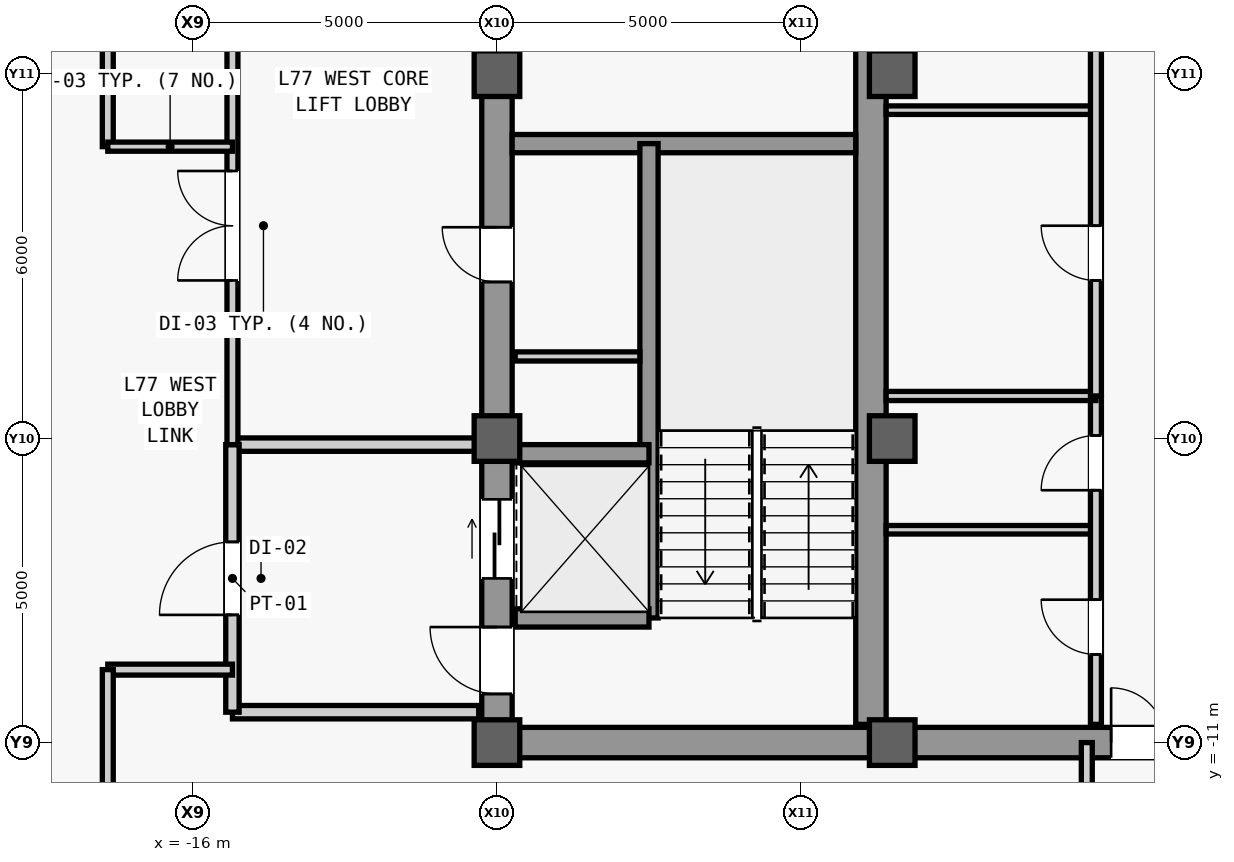
"""IFC4 building model, lengths in metres.
Left out: names, types, materials, properties, quantities, classifications, styles, units other than length and angle.
Written with IfcOpenShell. Run it as: python <this file> out.ifc"""

import sys

from ifc_helpers import new_model, si_unit, direction, frame, frame_2d, origin, origin_2d, place, context, subcontext, project, spatial, rectangle, extrude, source, transform, mapped, element, fill, save


model = new_model("IFC4")
c1 = context("Model", 3, precision=1e-05, world=origin(), true_north=direction((0.0, 1.0)))
c2 = subcontext(c1, "Body", "Model", "MODEL_VIEW")
j1 = project(units=[si_unit("LENGTHUNIT", "METRE"), si_unit("PLANEANGLEUNIT", "RADIAN")], contexts=[c1])
p1 = place(None, origin())
s1 = spatial("IfcSite", under=j1, at=p1, CompositionType="ELEMENT")
p2 = place(p1, origin())
s2 = spatial("IfcBuilding", under=s1, at=p2, CompositionType="ELEMENT")
p3 = place(p2, frame((0.0, 0.0, 326.3)))
s3 = spatial("IfcBuildingStorey", under=s2, at=p3, CompositionType="ELEMENT", Elevation=326.3)
m1 = source(origin(), c2, "Body", "SweptSolid", [
    extrude(rectangle(XDim=22.0, YDim=0.5, at=frame_2d((11.0, 0.0))), origin(), (0.0, 0.0, 1.0), 3.74),
])
p4 = place(p3, frame((-11.0, -11.0, 0.0), z_axis=(0.0, 0.0, 1.0), x_axis=(0.0, 1.0, 0.0)))
e1 = element("IfcWall", 1, at=p4, inside=s3, PredefinedType="SHEAR", context=c2, shape_type="MappedRepresentation", body=[
    mapped(m1, transform((0.0, 0.0, 0.0), scale=1.0)),
])
m2 = source(origin(), c2, "Body", "SweptSolid", [
    extrude(rectangle(XDim=1.1, YDim=2.2, at=frame_2d((0.55, 1.1))), frame((0.0, 0.26, 0.0), z_axis=(0.0, -1.0, 0.0), x_axis=(1.0, 0.0, 0.0)), (0.0, 0.0, 1.0), 0.52),
])
p5 = place(p4, frame((0.8, 0.0, 0.0)))
e2 = element("IfcOpeningElement", 2, at=p5, cuts=e1, PredefinedType="OPENING", context=c2, shape_type="MappedRepresentation", body=[
    mapped(m2, transform((0.0, 0.0, 0.0), scale=1.0)),
])
p6 = place(p4, frame((12.5, 0.0, 0.0)))
e3 = element("IfcOpeningElement", 3, at=p6, cuts=e1, PredefinedType="OPENING", context=c2, shape_type="MappedRepresentation", body=[
    mapped(m2, transform((0.0, 0.0, 0.0), scale=1.0)),
])
m3 = source(origin(), c2, "Body", "SweptSolid", [
    extrude(rectangle(XDim=0.9, YDim=2.15, at=frame_2d((0.45, 1.075))), frame((0.0, 0.26, 0.0), z_axis=(0.0, -1.0, 0.0), x_axis=(1.0, 0.0, 0.0)), (0.0, 0.0, 1.0), 0.52),
])
p7 = place(p4, frame((7.575, 0.0, 0.0)))
e4 = element("IfcOpeningElement", 4, at=p7, cuts=e1, PredefinedType="OPENING", context=c2, shape_type="MappedRepresentation", body=[
    mapped(m3, transform((0.0, 0.0, 0.0), scale=1.0)),
])
m4 = source(origin(), c2, "Body", "SweptSolid", [
    extrude(rectangle(XDim=1.2, YDim=2.3, at=frame_2d((0.6, 1.15))), frame((0.0, 0.26, 0.0), z_axis=(0.0, -1.0, 0.0), x_axis=(1.0, 0.0, 0.0)), (0.0, 0.0, 1.0), 0.52),
])
p8 = place(p4, frame((14.6, 0.0, 0.0)))
e5 = element("IfcOpeningElement", 5, at=p8, cuts=e1, PredefinedType="OPENING", context=c2, shape_type="MappedRepresentation", body=[
    mapped(m4, transform((0.0, 0.0, 0.0), scale=1.0)),
])
p9 = place(p4, frame((18.2, 0.0, 0.0)))
e6 = element("IfcOpeningElement", 6, at=p9, cuts=e1, PredefinedType="OPENING", context=c2, shape_type="MappedRepresentation", body=[
    mapped(m4, transform((0.0, 0.0, 0.0), scale=1.0)),
])
m5 = source(origin(), c2, "Body", "SweptSolid", [
    extrude(rectangle(XDim=1.3, YDim=2.3, at=frame_2d((0.65, 1.15))), frame((0.0, 0.26, 0.0), z_axis=(0.0, -1.0, 0.0), x_axis=(1.0, 0.0, 0.0)), (0.0, 0.0, 1.0), 0.52),
])
p10 = place(p4, frame((2.7, 0.0, 0.0)))
e7 = element("IfcOpeningElement", 7, at=p10, cuts=e1, PredefinedType="OPENING", context=c2, shape_type="MappedRepresentation", body=[
    mapped(m5, transform((0.0, 0.0, 0.0), scale=1.0)),
])
m6 = source(origin(), c2, "Body", "SweptSolid", [
    extrude(rectangle(XDim=21.4, YDim=0.5, at=frame_2d((10.7, 0.0))), origin(), (0.0, 0.0, 1.0), 3.74),
])
p11 = place(p3, frame((-4.85, -10.7, 0.0), z_axis=(0.0, 0.0, 1.0), x_axis=(0.0, 1.0, 0.0)))
e8 = element("IfcWall", 8, at=p11, inside=s3, PredefinedType="SHEAR", context=c2, shape_type="MappedRepresentation", body=[
    mapped(m6, transform((0.0, 0.0, 0.0), scale=1.0)),
])
m7 = source(origin(), c2, "Body", "SweptSolid", [
    extrude(rectangle(XDim=5.9, YDim=0.5, at=frame_2d((2.95, 0.0))), origin(), (0.0, 0.0, 1.0), 3.74),
])
p12 = place(p3, frame((-10.75, -11.0, 0.0), z_axis=(0.0, 0.0, 1.0), x_axis=(1.0, 0.0, 0.0)))
e9 = element("IfcWall", 9, at=p12, inside=s3, PredefinedType="SHEAR", context=c2, shape_type="MappedRepresentation", body=[
    mapped(m7, transform((0.0, 0.0, 0.0), scale=1.0)),
])
m8 = source(origin(), c2, "Body", "SweptSolid", [
    extrude(rectangle(XDim=5.65, YDim=0.3, at=frame_2d((2.825, 0.0))), origin(), (0.0, 0.0, 1.0), 3.74),
])
p13 = place(p3, frame((-10.75, -1.15, 0.0), z_axis=(0.0, 0.0, 1.0), x_axis=(1.0, 0.0, 0.0)))
e10 = element("IfcWall", 10, at=p13, inside=s3, PredefinedType="SHEAR", context=c2, shape_type="MappedRepresentation", body=[
    mapped(m8, transform((0.0, 0.0, 0.0), scale=1.0)),
])
m9 = source(origin(), c2, "Body", "SweptSolid", [
    extrude(rectangle(XDim=9.2, YDim=0.5, at=frame_2d((4.6, 0.0))), origin(), (0.0, 0.0, 1.0), 3.74),
])
p14 = place(p3, frame((-4.6, -11.0, 0.0), z_axis=(0.0, 0.0, 1.0), x_axis=(1.0, 0.0, 0.0)))
e11 = element("IfcWall", 11, at=p14, inside=s3, PredefinedType="SHEAR", context=c2, shape_type="MappedRepresentation", body=[
    mapped(m9, transform((0.0, 0.0, 0.0), scale=1.0)),
])
m10 = source(origin(), c2, "Body", "SweptSolid", [
    extrude(rectangle(XDim=1.8, YDim=2.25, at=frame_2d((0.9, 1.125))), frame((0.0, 0.26, 0.0), z_axis=(0.0, -1.0, 0.0), x_axis=(1.0, 0.0, 0.0)), (0.0, 0.0, 1.0), 0.52),
])
p15 = place(p14, frame((3.7, 0.0, 0.0)))
e12 = element("IfcOpeningElement", 12, at=p15, cuts=e11, PredefinedType="OPENING", context=c2, shape_type="MappedRepresentation", body=[
    mapped(m10, transform((0.0, 0.0, 0.0), scale=1.0)),
])
m11 = source(origin(), c2, "Body", "SweptSolid", [
    extrude(rectangle(XDim=0.75, YDim=0.75, at=origin_2d()), origin(), (0.0, 0.0, 1.0), 4.0),
])
for number, where, z_axis, x_axis in (
    (13, (-11.0, -11.0, 0.0), (0.0, 0.0, 1.0), (1.0, 0.0, 0.0)),
    (14, (-11.0, -6.0, 0.0), (0.0, 0.0, 1.0), (1.0, 0.0, 0.0)),
    (15, (-11.0, 0.0, 0.0), (0.0, 0.0, 1.0), (1.0, 0.0, 0.0)),
    (16, (-4.5, -11.0, 0.0), (0.0, 0.0, 1.0), (1.0, 0.0, 0.0)),
    (17, (-4.5, -6.0, 0.0), (0.0, 0.0, 1.0), (1.0, 0.0, 0.0)),
    (18, (-4.5, 0.0, 0.0), (0.0, 0.0, 1.0), (1.0, 0.0, 0.0)),
):
    element("IfcColumn", number, at=place(p3, frame(where, z_axis=z_axis, x_axis=x_axis)), inside=s3, PredefinedType="COLUMN", context=c2, shape_type="MappedRepresentation", body=[
        mapped(m11, transform((0.0, 0.0, 0.0), scale=1.0)),
    ])
m12 = source(origin(), c2, "Body", "SweptSolid", [
    extrude(rectangle(XDim=7.8, YDim=0.3, at=frame_2d((3.9, 0.0))), origin(), (0.0, 0.0, 1.0), 3.74),
])
p16 = place(p3, frame((-8.5, -8.95, 0.0), z_axis=(0.0, 0.0, 1.0), x_axis=(0.0, 1.0, 0.0)))
e19 = element("IfcWall", 19, at=p16, inside=s3, PredefinedType="SHEAR", context=c2, shape_type="MappedRepresentation", body=[
    mapped(m12, transform((0.0, 0.0, 0.0), scale=1.0)),
])
m13 = source(origin(), c2, "Body", "SweptSolid", [
    extrude(rectangle(XDim=2.2, YDim=0.3, at=frame_2d((1.1, 0.0))), origin(), (0.0, 0.0, 1.0), 3.74),
])
for number, where, z_axis, x_axis in (
    (20, (-10.7, -8.95, 0.0), (0.0, 0.0, 1.0), (1.0, 0.0, 0.0)),
    (21, (-10.7, -6.25, 0.0), (0.0, 0.0, 1.0), (1.0, 0.0, 0.0)),
):
    element("IfcWall", number, at=place(p3, frame(where, z_axis=z_axis, x_axis=x_axis)), inside=s3, PredefinedType="SHEAR", context=c2, shape_type="MappedRepresentation", body=[
        mapped(m13, transform((0.0, 0.0, 0.0), scale=1.0)),
    ])
m14 = source(origin(), c2, "Body", "SweptSolid", [
    extrude(rectangle(XDim=2.05, YDim=0.15, at=frame_2d((1.025, 0.0))), origin(), (0.0, 0.0, 1.0), 3.74),
])
p17 = place(p3, frame((-10.7, -4.65, 0.0), z_axis=(0.0, 0.0, 1.0), x_axis=(1.0, 0.0, 0.0)))
e22 = element("IfcWall", 22, at=p17, inside=s3, PredefinedType="PARTITIONING", context=c2, shape_type="MappedRepresentation", body=[
    mapped(m14, transform((0.0, 0.0, 0.0), scale=1.0)),
])
m15 = source(origin(), c2, "Body", "SweptSolid", [
    extrude(rectangle(XDim=4.05, YDim=0.22, at=frame_2d((2.025, 0.0))), origin(), (0.0, 0.0, 1.0), 3.74),
])
p18 = place(p3, frame((-15.35, -10.5, 0.0), z_axis=(0.0, 0.0, 1.0), x_axis=(1.0, 0.0, 0.0)))
e23 = element("IfcWall", 23, at=p18, inside=s3, PredefinedType="PARTITIONING", context=c2, shape_type="MappedRepresentation", body=[
    mapped(m15, transform((0.0, 0.0, 0.0), scale=1.0)),
])
m16 = source(origin(), c2, "Body", "SweptSolid", [
    extrude(rectangle(XDim=4.05, YDim=0.22, at=frame_2d((2.025, 0.0))), origin(), (0.0, 0.0, 1.0), 3.124),
])
p19 = place(p3, frame((-15.35, -6.1, 0.0), z_axis=(0.0, 0.0, 1.0), x_axis=(1.0, 0.0, 0.0)))
e24 = element("IfcWall", 24, at=p19, inside=s3, PredefinedType="PARTITIONING", context=c2, shape_type="MappedRepresentation", body=[
    mapped(m16, transform((0.0, 0.0, 0.0), scale=1.0)),
])
m17 = source(origin(), c2, "Body", "SweptSolid", [
    extrude(rectangle(XDim=4.4, YDim=0.22, at=frame_2d((2.2, 0.0))), origin(), (0.0, 0.0, 1.0), 3.74),
])
p20 = place(p3, frame((-15.35, -10.5, 0.0), z_axis=(0.0, 0.0, 1.0), x_axis=(0.0, 1.0, 0.0)))
e25 = element("IfcWall", 25, at=p20, inside=s3, PredefinedType="PARTITIONING", context=c2, shape_type="MappedRepresentation", body=[
    mapped(m17, transform((0.0, 0.0, 0.0), scale=1.0)),
])
m18 = source(origin(), c2, "Body", "SweptSolid", [
    extrude(rectangle(XDim=1.2, YDim=2.2, at=frame_2d((0.6, 1.1))), frame((0.0, 0.12, 0.0), z_axis=(0.0, -1.0, 0.0), x_axis=(1.0, 0.0, 0.0)), (0.0, 0.0, 1.0), 0.24),
])
p21 = place(p20, frame((1.6, 0.0, 0.0)))
e26 = element("IfcOpeningElement", 26, at=p21, cuts=e25, PredefinedType="OPENING", context=c2, shape_type="MappedRepresentation", body=[
    mapped(m18, transform((0.0, 0.0, 0.0), scale=1.0)),
])
m19 = source(origin(), c2, "Body", "SweptSolid", [
    extrude(rectangle(XDim=16.6, YDim=0.18, at=frame_2d((8.3, 0.0))), origin(), (0.0, 0.0, 1.0), 3.74),
])
p22 = place(p3, frame((-15.35, -6.1, 0.0), z_axis=(0.0, 0.0, 1.0), x_axis=(0.0, 1.0, 0.0)))
e27 = element("IfcWall", 27, at=p22, inside=s3, PredefinedType="PARTITIONING", context=c2, shape_type="MappedRepresentation", body=[
    mapped(m19, transform((0.0, 0.0, 0.0), scale=1.0)),
])
m20 = source(origin(), c2, "Body", "SweptSolid", [
    extrude(rectangle(XDim=1.8, YDim=2.25, at=frame_2d((0.9, 1.125))), frame((0.0, 0.1, 0.0), z_axis=(0.0, -1.0, 0.0), x_axis=(1.0, 0.0, 0.0)), (0.0, 0.0, 1.0), 0.2),
])
p23 = place(p22, frame((2.7, 0.0, 0.0)))
e28 = element("IfcOpeningElement", 28, at=p23, cuts=e27, PredefinedType="OPENING", context=c2, shape_type="MappedRepresentation", body=[
    mapped(m20, transform((0.0, 0.0, 0.0), scale=1.0)),
])
p24 = place(p22, frame((11.0, 0.0, 0.0)))
e29 = element("IfcOpeningElement", 29, at=p24, cuts=e27, PredefinedType="OPENING", context=c2, shape_type="MappedRepresentation", body=[
    mapped(m20, transform((0.0, 0.0, 0.0), scale=1.0)),
])
m21 = source(origin(), c2, "Body", "SweptSolid", [
    extrude(rectangle(XDim=3.45, YDim=0.14, at=frame_2d((1.725, 0.0))), origin(), (0.0, 0.0, 1.0), 3.74),
])
p25 = place(p3, frame((-4.6, -7.5, 0.0), z_axis=(0.0, 0.0, 1.0), x_axis=(1.0, 0.0, 0.0)))
e30 = element("IfcWall", 30, at=p25, inside=s3, PredefinedType="PARTITIONING", context=c2, shape_type="MappedRepresentation", body=[
    mapped(m21, transform((0.0, 0.0, 0.0), scale=1.0)),
])
m22 = source(origin(), c2, "Body", "SweptSolid", [
    extrude(rectangle(XDim=5.4, YDim=0.18, at=frame_2d((2.7, 0.0))), origin(), (0.0, 0.0, 1.0), 3.74),
])
p26 = place(p3, frame((-1.15, -10.7, 0.0), z_axis=(0.0, 0.0, 1.0), x_axis=(0.0, 1.0, 0.0)))
e31 = element("IfcWall", 31, at=p26, inside=s3, PredefinedType="PARTITIONING", context=c2, shape_type="MappedRepresentation", body=[
    mapped(m22, transform((0.0, 0.0, 0.0), scale=1.0)),
])
m23 = source(origin(), c2, "Body", "SweptSolid", [
    extrude(rectangle(XDim=0.9, YDim=2.15, at=frame_2d((0.45, 1.075))), frame((0.0, 0.1, 0.0), z_axis=(0.0, -1.0, 0.0), x_axis=(1.0, 0.0, 0.0)), (0.0, 0.0, 1.0), 0.2),
])
p27 = place(p26, frame((1.15, 0.0, 0.0)))
e32 = element("IfcOpeningElement", 32, at=p27, cuts=e31, PredefinedType="OPENING", context=c2, shape_type="MappedRepresentation", body=[
    mapped(m23, transform((0.0, 0.0, 0.0), scale=1.0)),
])
p28 = place(p26, frame((3.85, 0.0, 0.0)))
e33 = element("IfcOpeningElement", 33, at=p28, cuts=e31, PredefinedType="OPENING", context=c2, shape_type="MappedRepresentation", body=[
    mapped(m23, transform((0.0, 0.0, 0.0), scale=1.0)),
])
m24 = source(origin(), c2, "Body", "SweptSolid", [
    extrude(rectangle(XDim=3.45, YDim=0.15, at=frame_2d((1.725, 0.0))), origin(), (0.0, 0.0, 1.0), 3.74),
])
p29 = place(p3, frame((-4.6, -5.3, 0.0), z_axis=(0.0, 0.0, 1.0), x_axis=(1.0, 0.0, 0.0)))
e34 = element("IfcWall", 34, at=p29, inside=s3, PredefinedType="PARTITIONING", context=c2, shape_type="MappedRepresentation", body=[
    mapped(m24, transform((0.0, 0.0, 0.0), scale=1.0)),
])
p30 = place(p3, frame((-4.6, -0.6, 0.0), z_axis=(0.0, 0.0, 1.0), x_axis=(1.0, 0.0, 0.0)))
e35 = element("IfcWall", 35, at=p30, inside=s3, PredefinedType="PARTITIONING", context=c2, shape_type="MappedRepresentation", body=[
    mapped(m21, transform((0.0, 0.0, 0.0), scale=1.0)),
])
m25 = source(origin(), c2, "Body", "SweptSolid", [
    extrude(rectangle(XDim=10.6, YDim=0.18, at=frame_2d((5.3, 0.0))), origin(), (0.0, 0.0, 1.0), 3.74),
])
p31 = place(p3, frame((-1.15, -5.3, 0.0), z_axis=(0.0, 0.0, 1.0), x_axis=(0.0, 1.0, 0.0)))
e36 = element("IfcWall", 36, at=p31, inside=s3, PredefinedType="PARTITIONING", context=c2, shape_type="MappedRepresentation", body=[
    mapped(m25, transform((0.0, 0.0, 0.0), scale=1.0)),
])
p32 = place(p31, frame((1.9, 0.0, 0.0)))
e37 = element("IfcOpeningElement", 37, at=p32, cuts=e36, PredefinedType="OPENING", context=c2, shape_type="MappedRepresentation", body=[
    mapped(m23, transform((0.0, 0.0, 0.0), scale=1.0)),
])
p33 = place(p31, frame((6.55, 0.0, 0.0)))
e38 = element("IfcOpeningElement", 38, at=p33, cuts=e36, PredefinedType="OPENING", context=c2, shape_type="MappedRepresentation", body=[
    mapped(m23, transform((0.0, 0.0, 0.0), scale=1.0)),
])
p34 = place(p31, frame((9.475, 0.0, 0.0)))
e39 = element("IfcOpeningElement", 39, at=p34, cuts=e36, PredefinedType="OPENING", context=c2, shape_type="MappedRepresentation", body=[
    mapped(m23, transform((0.0, 0.0, 0.0), scale=1.0)),
])
m26 = source(origin(), c2, "Body", "SweptSolid", [
    extrude(rectangle(XDim=5.6, YDim=0.18, at=frame_2d((2.8, 0.0))), origin(), (0.0, 0.0, 1.0), 3.74),
])
p35 = place(p3, frame((-17.4, -1.2, 0.0), z_axis=(0.0, 0.0, 1.0), x_axis=(0.0, 1.0, 0.0)))
e40 = element("IfcWall", 40, at=p35, inside=s3, PredefinedType="PARTITIONING", context=c2, shape_type="MappedRepresentation", body=[
    mapped(m26, transform((0.0, 0.0, 0.0), scale=1.0)),
])
p36 = place(p35, frame((2.35, 0.0, 0.0)))
e41 = element("IfcOpeningElement", 41, at=p36, cuts=e40, PredefinedType="OPENING", context=c2, shape_type="MappedRepresentation", body=[
    mapped(m23, transform((0.0, 0.0, 0.0), scale=1.0)),
])
m27 = source(origin(), c2, "Body", "SweptSolid", [
    extrude(rectangle(XDim=2.05, YDim=0.15, at=frame_2d((1.025, 0.0))), origin(), (0.0, 0.0, 1.0), 3.74),
])
p37 = place(p3, frame((-17.4, -1.2, 0.0), z_axis=(0.0, 0.0, 1.0), x_axis=(1.0, 0.0, 0.0)))
e42 = element("IfcWall", 42, at=p37, inside=s3, PredefinedType="PARTITIONING", context=c2, shape_type="MappedRepresentation", body=[
    mapped(m27, transform((0.0, 0.0, 0.0), scale=1.0)),
])
m28 = source(origin(), c2, "Body", "SweptSolid", [
    extrude(rectangle(XDim=2.05, YDim=0.18, at=frame_2d((1.025, 0.0))), origin(), (0.0, 0.0, 1.0), 3.74),
])
p38 = place(p3, frame((-17.4, -9.8, 0.0), z_axis=(0.0, 0.0, 1.0), x_axis=(1.0, 0.0, 0.0)))
e43 = element("IfcWall", 43, at=p38, inside=s3, PredefinedType="PARTITIONING", context=c2, shape_type="MappedRepresentation", body=[
    mapped(m28, transform((0.0, 0.0, 0.0), scale=1.0)),
])
m29 = source(origin(), c2, "Body", "SweptSolid", [
    extrude(rectangle(XDim=7.2, YDim=0.18, at=frame_2d((3.6, 0.0))), origin(), (0.0, 0.0, 1.0), 3.74),
])
p39 = place(p3, frame((-17.4, -17.0, 0.0), z_axis=(0.0, 0.0, 1.0), x_axis=(0.0, 1.0, 0.0)))
e44 = element("IfcWall", 44, at=p39, inside=s3, PredefinedType="PARTITIONING", context=c2, shape_type="MappedRepresentation", body=[
    mapped(m29, transform((0.0, 0.0, 0.0), scale=1.0)),
])
m30 = source(origin(), c2, "Body", "SweptSolid", [
    extrude(rectangle(XDim=6.0, YDim=0.18, at=frame_2d((3.0, 0.0))), origin(), (0.0, 0.0, 1.0), 3.74),
])
p40 = place(p3, frame((-1.3, -17.0, 0.0), z_axis=(0.0, 0.0, 1.0), x_axis=(0.0, 1.0, 0.0)))
e45 = element("IfcWall", 45, at=p40, inside=s3, PredefinedType="PARTITIONING", context=c2, shape_type="MappedRepresentation", body=[
    mapped(m30, transform((0.0, 0.0, 0.0), scale=1.0)),
])
m31 = source(origin(), c2, "Body", "SweptSolid", [
    extrude(rectangle(XDim=1.1, YDim=2.2, at=frame_2d((0.55, 1.1))), frame((0.0, 0.025, 0.0), z_axis=(0.0, -1.0, 0.0), x_axis=(1.0, 0.0, 0.0)), (0.0, 0.0, 1.0), 0.05),
])
p41 = place(p5, origin())
e46 = element("IfcDoor", 46, at=p41, inside=s3, OperationType="SINGLE_SWING_RIGHT", PredefinedType="DOOR", context=c2, shape_type="MappedRepresentation", body=[
    mapped(m31, transform((0.0, 0.0, 0.0), scale=1.0)),
])
fill(e2, e46)
m32 = source(origin(), c2, "Body", "SweptSolid", [
    extrude(rectangle(XDim=0.9, YDim=2.15, at=frame_2d((0.45, 1.075))), frame((0.0, 0.025, 0.0), z_axis=(0.0, -1.0, 0.0), x_axis=(1.0, 0.0, 0.0)), (0.0, 0.0, 1.0), 0.05),
])
p42 = place(p7, origin())
e47 = element("IfcDoor", 47, at=p42, inside=s3, OperationType="SINGLE_SWING_RIGHT", PredefinedType="DOOR", context=c2, shape_type="MappedRepresentation", body=[
    mapped(m32, transform((0.0, 0.0, 0.0), scale=1.0)),
])
fill(e4, e47)
m33 = source(origin(), c2, "Body", "SweptSolid", [
    extrude(rectangle(XDim=1.2, YDim=2.2, at=frame_2d((0.6, 1.1))), frame((0.0, 0.025, 0.0), z_axis=(0.0, -1.0, 0.0), x_axis=(1.0, 0.0, 0.0)), (0.0, 0.0, 1.0), 0.05),
])
p43 = place(p21, origin())
e48 = element("IfcDoor", 48, at=p43, inside=s3, OperationType="SINGLE_SWING_LEFT", PredefinedType="DOOR", context=c2, shape_type="MappedRepresentation", body=[
    mapped(m33, transform((0.0, 0.0, 0.0), scale=1.0)),
])
fill(e26, e48)
m34 = source(origin(), c2, "Body", "SweptSolid", [
    extrude(rectangle(XDim=1.8, YDim=2.25, at=frame_2d((0.9, 1.125))), frame((0.0, 0.025, 0.0), z_axis=(0.0, -1.0, 0.0), x_axis=(1.0, 0.0, 0.0)), (0.0, 0.0, 1.0), 0.05),
])
p44 = place(p23, origin())
e49 = element("IfcDoor", 49, at=p44, inside=s3, OperationType="SINGLE_SWING_LEFT", PredefinedType="DOOR", context=c2, shape_type="MappedRepresentation", body=[
    mapped(m34, transform((0.0, 0.0, 0.0), scale=1.0)),
])
fill(e28, e49)
p45 = place(p27, origin())
e50 = element("IfcDoor", 50, at=p45, inside=s3, OperationType="SINGLE_SWING_RIGHT", PredefinedType="DOOR", context=c2, shape_type="MappedRepresentation", body=[
    mapped(m32, transform((0.0, 0.0, 0.0), scale=1.0)),
])
fill(e32, e50)
p46 = place(p28, origin())
e51 = element("IfcDoor", 51, at=p46, inside=s3, OperationType="SINGLE_SWING_LEFT", PredefinedType="DOOR", context=c2, shape_type="MappedRepresentation", body=[
    mapped(m32, transform((0.0, 0.0, 0.0), scale=1.0)),
])
fill(e33, e51)
p47 = place(p15, origin())
e52 = element("IfcDoor", 52, at=p47, inside=s3, OperationType="SINGLE_SWING_LEFT", PredefinedType="DOOR", context=c2, shape_type="MappedRepresentation", body=[
    mapped(m34, transform((0.0, 0.0, 0.0), scale=1.0)),
])
fill(e12, e52)
p48 = place(p32, origin())
e53 = element("IfcDoor", 53, at=p48, inside=s3, OperationType="SINGLE_SWING_RIGHT", PredefinedType="DOOR", context=c2, shape_type="MappedRepresentation", body=[
    mapped(m32, transform((0.0, 0.0, 0.0), scale=1.0)),
])
fill(e37, e53)
m35 = source(origin(), c2, "Body", "SweptSolid", [
    extrude(rectangle(XDim=1.3, YDim=2.3, at=frame_2d((0.65, 1.15))), frame((0.0, 0.025, 0.0), z_axis=(0.0, -1.0, 0.0), x_axis=(1.0, 0.0, 0.0)), (0.0, 0.0, 1.0), 0.05),
])
p49 = place(p10, origin())
e54 = element("IfcDoor", 54, at=p49, inside=s3, OperationType="SLIDING_TO_LEFT", PredefinedType="DOOR", context=c2, shape_type="MappedRepresentation", body=[
    mapped(m35, transform((0.0, 0.0, 0.0), scale=1.0)),
])
fill(e7, e54)
save(model, sys.argv[1])
